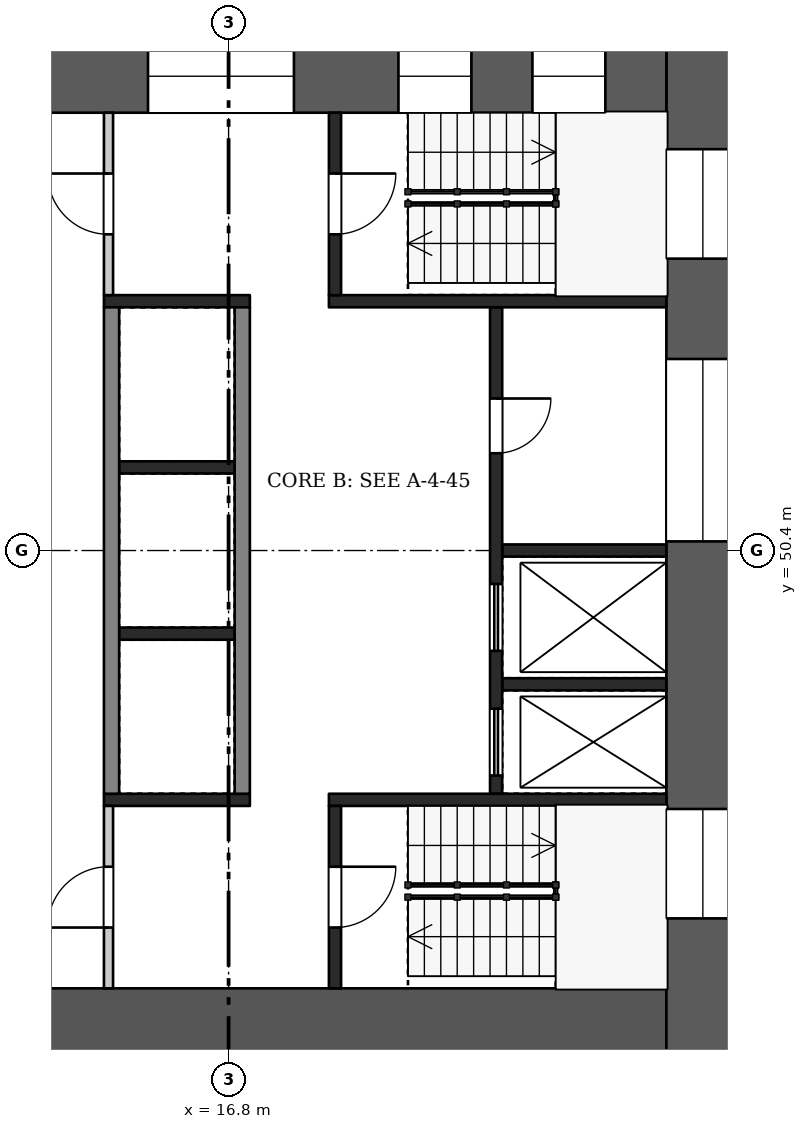
"""IFC4 building model, lengths in metres.
Left out: names, types, materials, properties, quantities, classifications, styles, units other than length and angle.
Written with IfcOpenShell. Run it as: python <this file> out.ifc"""

import sys

from ifc_helpers import new_model, si_unit, direction, frame, frame_2d, origin, place, context, subcontext, project, spatial, rectangle, extrude, element, fill, save


model = new_model("IFC4")
c1 = context("Model", 3, precision=1e-05, world=origin(), true_north=direction((0.0, 1.0)))
c2 = subcontext(c1, "Body", "Model", "MODEL_VIEW")
j1 = project(units=[si_unit("LENGTHUNIT", "METRE"), si_unit("PLANEANGLEUNIT", "RADIAN")], contexts=[c1])
p1 = place(None, origin())
s1 = spatial("IfcSite", under=j1, at=p1, CompositionType="ELEMENT")
p2 = place(p1, origin())
s2 = spatial("IfcBuilding", under=s1, at=p2, CompositionType="ELEMENT")
p3 = place(p2, frame((0.0, 0.0, 25.2)))
s3 = spatial("IfcBuildingStorey", under=s2, at=p3, CompositionType="ELEMENT", Elevation=25.2)
p4 = place(p3, frame((24.6, 58.8, 0.0), z_axis=(0.0, 0.0, 1.0), x_axis=(0.0, -1.0, 0.0)))
e1 = element("IfcWall", 1, at=p4, inside=s3, PredefinedType="SHEAR", context=c2, shape_type="SweptSolid", body=[
    extrude(rectangle(XDim=16.8, YDim=1.2, at=frame_2d((8.4, 0.0))), origin(), (0.0, 0.0, 1.0), 3.22),
])
p5 = place(p4, frame((1.8, 0.0, 0.5)))
e2 = element("IfcOpeningElement", 2, at=p5, cuts=e1, PredefinedType="OPENING", context=c2, shape_type="SweptSolid", body=[
    extrude(rectangle(XDim=1.8, YDim=2.4, at=frame_2d((0.9, 1.2))), frame((0.0, 0.61, 0.0), z_axis=(0.0, -1.0, 0.0), x_axis=(1.0, 0.0, 0.0)), (0.0, 0.0, 1.0), 1.22),
])
p6 = place(p4, frame((5.25, 0.0, 1.6)))
e3 = element("IfcOpeningElement", 3, at=p6, cuts=e1, PredefinedType="OPENING", context=c2, shape_type="SweptSolid", body=[
    extrude(rectangle(XDim=3.0, YDim=1.2, at=frame_2d((1.5, 0.6))), frame((0.0, 0.61, 0.0), z_axis=(0.0, -1.0, 0.0), x_axis=(1.0, 0.0, 0.0)), (0.0, 0.0, 1.0), 1.22),
])
p7 = place(p4, frame((12.65, 0.0, 0.5)))
e4 = element("IfcOpeningElement", 4, at=p7, cuts=e1, PredefinedType="OPENING", context=c2, shape_type="SweptSolid", body=[
    extrude(rectangle(XDim=1.8, YDim=2.4, at=frame_2d((0.9, 1.2))), frame((0.0, 0.61, 0.0), z_axis=(0.0, -1.0, 0.0), x_axis=(1.0, 0.0, 0.0)), (0.0, 0.0, 1.0), 1.22),
])
p8 = place(p3, frame((9.6, 58.2, 0.0), z_axis=(0.0, 0.0, 1.0), x_axis=(1.0, 0.0, 0.0)))
e5 = element("IfcWall", 5, at=p8, inside=s3, PredefinedType="SHEAR", context=c2, shape_type="SweptSolid", body=[
    extrude(rectangle(XDim=14.4, YDim=1.2, at=frame_2d((7.2, 0.0))), origin(), (0.0, 0.0, 1.0), 3.22),
])
p9 = place(p8, frame((1.105, 0.0, 0.6)))
e6 = element("IfcOpeningElement", 6, at=p9, cuts=e5, PredefinedType="OPENING", context=c2, shape_type="SweptSolid", body=[
    extrude(rectangle(XDim=3.0, YDim=2.1, at=frame_2d((1.5, 1.05))), frame((0.0, 0.61, 0.0), z_axis=(0.0, -1.0, 0.0), x_axis=(1.0, 0.0, 0.0)), (0.0, 0.0, 1.0), 1.22),
])
p10 = place(p8, frame((5.875, 0.0, 0.6)))
e7 = element("IfcOpeningElement", 7, at=p10, cuts=e5, PredefinedType="OPENING", context=c2, shape_type="SweptSolid", body=[
    extrude(rectangle(XDim=2.4, YDim=2.1, at=frame_2d((1.2, 1.05))), frame((0.0, 0.61, 0.0), z_axis=(0.0, -1.0, 0.0), x_axis=(1.0, 0.0, 0.0)), (0.0, 0.0, 1.0), 1.22),
])
p11 = place(p8, frame((9.993, 0.0, 0.5)))
e8 = element("IfcOpeningElement", 8, at=p11, cuts=e5, PredefinedType="OPENING", context=c2, shape_type="SweptSolid", body=[
    extrude(rectangle(XDim=1.2, YDim=2.4, at=frame_2d((0.6, 1.2))), frame((0.0, 0.61, 0.0), z_axis=(0.0, -1.0, 0.0), x_axis=(1.0, 0.0, 0.0)), (0.0, 0.0, 1.0), 1.22),
])
p12 = place(p8, frame((12.197, 0.0, 0.5)))
e9 = element("IfcOpeningElement", 9, at=p12, cuts=e5, PredefinedType="OPENING", context=c2, shape_type="SweptSolid", body=[
    extrude(rectangle(XDim=1.2, YDim=2.4, at=frame_2d((0.6, 1.2))), frame((0.0, 0.61, 0.0), z_axis=(0.0, -1.0, 0.0), x_axis=(1.0, 0.0, 0.0)), (0.0, 0.0, 1.0), 1.22),
])
p13 = place(p3, frame((9.6, 42.6, 0.0), z_axis=(0.0, 0.0, 1.0), x_axis=(1.0, 0.0, 0.0)))
e10 = element("IfcWall", 10, at=p13, inside=s3, PredefinedType="SHEAR", context=c2, shape_type="SweptSolid", body=[
    extrude(rectangle(XDim=14.4, YDim=1.2, at=frame_2d((7.2, 0.0))), origin(), (0.0, 0.0, 1.0), 3.22),
])
p14 = place(p13, frame((2.1, 0.0, 0.0)))
e11 = element("IfcOpeningElement", 11, at=p14, cuts=e10, PredefinedType="OPENING", context=c2, shape_type="SweptSolid", body=[
    extrude(rectangle(XDim=1.8, YDim=2.1, at=frame_2d((0.9, 1.05))), frame((0.0, 0.61, 0.0), z_axis=(0.0, -1.0, 0.0), x_axis=(1.0, 0.0, 0.0)), (0.0, 0.0, 1.0), 1.22),
])
for number, where, z_axis, x_axis in (
    (12, (15.0, 51.767, 0.0), (0.0, 0.0, 1.0), (1.0, 0.0, 0.0)),
    (13, (15.0, 49.033, 0.0), (0.0, 0.0, 1.0), (1.0, 0.0, 0.0)),
):
    element("IfcWall", number, at=place(p3, frame(where, z_axis=z_axis, x_axis=x_axis)), inside=s3, PredefinedType="SHEAR", context=c2, shape_type="SweptSolid", body=[
        extrude(rectangle(XDim=1.9, YDim=0.2, at=frame_2d((0.95, 0.0))), origin(), (0.0, 0.0, 1.0), 3.22),
    ])
for number, where, z_axis, x_axis in (
    (14, (14.875, 54.4, 0.0), (0.0, 0.0, 1.0), (0.0, -1.0, 0.0)),
    (15, (17.025, 54.4, 0.0), (0.0, 0.0, 1.0), (0.0, -1.0, 0.0)),
):
    element("IfcWall", number, at=place(p3, frame(where, z_axis=z_axis, x_axis=x_axis)), inside=s3, PredefinedType="SHEAR", context=c2, shape_type="SweptSolid", body=[
        extrude(rectangle(XDim=8.0, YDim=0.25, at=frame_2d((4.0, 0.0))), origin(), (0.0, 0.0, 1.0), 3.22),
    ])
for number, where, z_axis, x_axis in (
    (16, (21.3, 50.4, 0.0), (0.0, 0.0, 1.0), (1.0, 0.0, 0.0)),
    (17, (21.3, 48.2, 0.0), (0.0, 0.0, 1.0), (1.0, 0.0, 0.0)),
):
    element("IfcWall", number, at=place(p3, frame(where, z_axis=z_axis, x_axis=x_axis)), inside=s3, PredefinedType="SHEAR", context=c2, shape_type="SweptSolid", body=[
        extrude(rectangle(XDim=2.7, YDim=0.2, at=frame_2d((1.35, 0.0))), origin(), (0.0, 0.0, 1.0), 3.22),
    ])
p15 = place(p3, frame((21.2, 54.4, 0.0), z_axis=(0.0, 0.0, 1.0), x_axis=(0.0, -1.0, 0.0)))
e18 = element("IfcWall", 18, at=p15, inside=s3, PredefinedType="SHEAR", context=c2, shape_type="SweptSolid", body=[
    extrude(rectangle(XDim=8.0, YDim=0.2, at=frame_2d((4.0, 0.0))), origin(), (0.0, 0.0, 1.0), 3.22),
])
p16 = place(p15, frame((1.5, 0.0, 0.0)))
e19 = element("IfcOpeningElement", 19, at=p16, cuts=e18, PredefinedType="OPENING", context=c2, shape_type="SweptSolid", body=[
    extrude(rectangle(XDim=0.9, YDim=2.1, at=frame_2d((0.45, 1.05))), frame((0.0, 0.11, 0.0), z_axis=(0.0, -1.0, 0.0), x_axis=(1.0, 0.0, 0.0)), (0.0, 0.0, 1.0), 0.22),
])
p17 = place(p15, frame((4.55, 0.0, 0.0)))
e20 = element("IfcOpeningElement", 20, at=p17, cuts=e18, PredefinedType="OPENING", context=c2, shape_type="SweptSolid", body=[
    extrude(rectangle(XDim=1.1, YDim=2.1, at=frame_2d((0.55, 1.05))), frame((0.0, 0.11, 0.0), z_axis=(0.0, -1.0, 0.0), x_axis=(1.0, 0.0, 0.0)), (0.0, 0.0, 1.0), 0.22),
])
p18 = place(p15, frame((6.6, 0.0, 0.0)))
e21 = element("IfcOpeningElement", 21, at=p18, cuts=e18, PredefinedType="OPENING", context=c2, shape_type="SweptSolid", body=[
    extrude(rectangle(XDim=1.1, YDim=2.1, at=frame_2d((0.55, 1.05))), frame((0.0, 0.11, 0.0), z_axis=(0.0, -1.0, 0.0), x_axis=(1.0, 0.0, 0.0)), (0.0, 0.0, 1.0), 0.22),
])
p19 = place(p3, frame((14.75, 54.5, 0.0), z_axis=(0.0, 0.0, 1.0), x_axis=(1.0, 0.0, 0.0)))
e22 = element("IfcWall", 22, at=p19, inside=s3, PredefinedType="SHEAR", context=c2, shape_type="SweptSolid", body=[
    extrude(rectangle(XDim=2.4, YDim=0.2, at=frame_2d((1.2, 0.0))), origin(), (0.0, 0.0, 1.0), 3.22),
])
p20 = place(p3, frame((18.45, 54.5, 0.0), z_axis=(0.0, 0.0, 1.0), x_axis=(1.0, 0.0, 0.0)))
e23 = element("IfcWall", 23, at=p20, inside=s3, PredefinedType="SHEAR", context=c2, shape_type="SweptSolid", body=[
    extrude(rectangle(XDim=5.55, YDim=0.2, at=frame_2d((2.775, 0.0))), origin(), (0.0, 0.0, 1.0), 3.22),
])
p21 = place(p3, frame((14.825, 57.6, 0.0), z_axis=(0.0, 0.0, 1.0), x_axis=(0.0, -1.0, 0.0)))
e24 = element("IfcWall", 24, at=p21, inside=s3, PredefinedType="PARTITIONING", context=c2, shape_type="SweptSolid", body=[
    extrude(rectangle(XDim=3.0, YDim=0.15, at=frame_2d((1.5, 0.0))), origin(), (0.0, 0.0, 1.0), 3.22),
])
p22 = place(p21, frame((1.0, 0.0, 0.0)))
e25 = element("IfcOpeningElement", 25, at=p22, cuts=e24, PredefinedType="OPENING", context=c2, shape_type="SweptSolid", body=[
    extrude(rectangle(XDim=1.0, YDim=2.1, at=frame_2d((0.5, 1.05))), frame((0.0, 0.085, 0.0), z_axis=(0.0, -1.0, 0.0), x_axis=(1.0, 0.0, 0.0)), (0.0, 0.0, 1.0), 0.17),
])
p23 = place(p3, frame((18.55, 57.6, 0.0), z_axis=(0.0, 0.0, 1.0), x_axis=(0.0, -1.0, 0.0)))
e26 = element("IfcWall", 26, at=p23, inside=s3, PredefinedType="SHEAR", context=c2, shape_type="SweptSolid", body=[
    extrude(rectangle(XDim=3.0, YDim=0.2, at=frame_2d((1.5, 0.0))), origin(), (0.0, 0.0, 1.0), 3.22),
])
p24 = place(p23, frame((1.0, 0.0, 0.0)))
e27 = element("IfcOpeningElement", 27, at=p24, cuts=e26, PredefinedType="OPENING", context=c2, shape_type="SweptSolid", body=[
    extrude(rectangle(XDim=1.0, YDim=2.1, at=frame_2d((0.5, 1.05))), frame((0.0, 0.11, 0.0), z_axis=(0.0, -1.0, 0.0), x_axis=(1.0, 0.0, 0.0)), (0.0, 0.0, 1.0), 0.22),
])
p25 = place(p3, frame((14.75, 46.3, 0.0), z_axis=(0.0, 0.0, 1.0), x_axis=(1.0, 0.0, 0.0)))
e28 = element("IfcWall", 28, at=p25, inside=s3, PredefinedType="SHEAR", context=c2, shape_type="SweptSolid", body=[
    extrude(rectangle(XDim=2.4, YDim=0.2, at=frame_2d((1.2, 0.0))), origin(), (0.0, 0.0, 1.0), 3.22),
])
p26 = place(p3, frame((18.45, 46.3, 0.0), z_axis=(0.0, 0.0, 1.0), x_axis=(1.0, 0.0, 0.0)))
e29 = element("IfcWall", 29, at=p26, inside=s3, PredefinedType="SHEAR", context=c2, shape_type="SweptSolid", body=[
    extrude(rectangle(XDim=5.55, YDim=0.2, at=frame_2d((2.775, 0.0))), origin(), (0.0, 0.0, 1.0), 3.22),
])
p27 = place(p3, frame((14.825, 46.2, 0.0), z_axis=(0.0, 0.0, 1.0), x_axis=(0.0, -1.0, 0.0)))
e30 = element("IfcWall", 30, at=p27, inside=s3, PredefinedType="PARTITIONING", context=c2, shape_type="SweptSolid", body=[
    extrude(rectangle(XDim=3.0, YDim=0.15, at=frame_2d((1.5, 0.0))), origin(), (0.0, 0.0, 1.0), 3.22),
])
p28 = place(p27, frame((1.0, 0.0, 0.0)))
e31 = element("IfcOpeningElement", 31, at=p28, cuts=e30, PredefinedType="OPENING", context=c2, shape_type="SweptSolid", body=[
    extrude(rectangle(XDim=1.0, YDim=2.1, at=frame_2d((0.5, 1.05))), frame((0.0, 0.085, 0.0), z_axis=(0.0, -1.0, 0.0), x_axis=(1.0, 0.0, 0.0)), (0.0, 0.0, 1.0), 0.17),
])
p29 = place(p3, frame((18.55, 46.2, 0.0), z_axis=(0.0, 0.0, 1.0), x_axis=(0.0, -1.0, 0.0)))
e32 = element("IfcWall", 32, at=p29, inside=s3, PredefinedType="SHEAR", context=c2, shape_type="SweptSolid", body=[
    extrude(rectangle(XDim=3.0, YDim=0.2, at=frame_2d((1.5, 0.0))), origin(), (0.0, 0.0, 1.0), 3.22),
])
p30 = place(p29, frame((1.0, 0.0, 0.0)))
e33 = element("IfcOpeningElement", 33, at=p30, cuts=e32, PredefinedType="OPENING", context=c2, shape_type="SweptSolid", body=[
    extrude(rectangle(XDim=1.0, YDim=2.1, at=frame_2d((0.5, 1.05))), frame((0.0, 0.11, 0.0), z_axis=(0.0, -1.0, 0.0), x_axis=(1.0, 0.0, 0.0)), (0.0, 0.0, 1.0), 0.22),
])
p31 = place(p16, origin())
e34 = element("IfcDoor", 34, at=p31, inside=s3, OperationType="SINGLE_SWING_LEFT", PredefinedType="DOOR", context=c2, shape_type="SweptSolid", body=[
    extrude(rectangle(XDim=0.9, YDim=2.1, at=frame_2d((0.45, 1.05))), frame((0.0, 0.025, 0.0), z_axis=(0.0, -1.0, 0.0), x_axis=(1.0, 0.0, 0.0)), (0.0, 0.0, 1.0), 0.05),
])
fill(e19, e34)
p32 = place(p17, origin())
e35 = element("IfcDoor", 35, at=p32, inside=s3, OperationType="DOUBLE_DOOR_SLIDING", PredefinedType="DOOR", context=c2, shape_type="SweptSolid", body=[
    extrude(rectangle(XDim=1.1, YDim=2.1, at=frame_2d((0.55, 1.05))), frame((0.0, 0.025, 0.0), z_axis=(0.0, -1.0, 0.0), x_axis=(1.0, 0.0, 0.0)), (0.0, 0.0, 1.0), 0.05),
])
fill(e20, e35)
p33 = place(p18, origin())
e36 = element("IfcDoor", 36, at=p33, inside=s3, OperationType="DOUBLE_DOOR_SLIDING", PredefinedType="DOOR", context=c2, shape_type="SweptSolid", body=[
    extrude(rectangle(XDim=1.1, YDim=2.1, at=frame_2d((0.55, 1.05))), frame((0.0, 0.025, 0.0), z_axis=(0.0, -1.0, 0.0), x_axis=(1.0, 0.0, 0.0)), (0.0, 0.0, 1.0), 0.05),
])
fill(e21, e36)
p34 = place(p22, frame((1.0, 0.0, 0.0), z_axis=(0.0, 0.0, 1.0), x_axis=(-1.0, 0.0, 0.0)))
e37 = element("IfcDoor", 37, at=p34, inside=s3, OperationType="SINGLE_SWING_RIGHT", PredefinedType="DOOR", context=c2, shape_type="SweptSolid", body=[
    extrude(rectangle(XDim=1.0, YDim=2.1, at=frame_2d((0.5, 1.05))), frame((0.0, 0.025, 0.0), z_axis=(0.0, -1.0, 0.0), x_axis=(1.0, 0.0, 0.0)), (0.0, 0.0, 1.0), 0.05),
])
fill(e25, e37)
p35 = place(p24, origin())
e38 = element("IfcDoor", 38, at=p35, inside=s3, OperationType="SINGLE_SWING_LEFT", PredefinedType="DOOR", context=c2, shape_type="SweptSolid", body=[
    extrude(rectangle(XDim=1.0, YDim=2.1, at=frame_2d((0.5, 1.05))), frame((0.0, 0.025, 0.0), z_axis=(0.0, -1.0, 0.0), x_axis=(1.0, 0.0, 0.0)), (0.0, 0.0, 1.0), 0.05),
])
fill(e27, e38)
p36 = place(p28, frame((1.0, 0.0, 0.0), z_axis=(0.0, 0.0, 1.0), x_axis=(-1.0, 0.0, 0.0)))
e39 = element("IfcDoor", 39, at=p36, inside=s3, OperationType="SINGLE_SWING_LEFT", PredefinedType="DOOR", context=c2, shape_type="SweptSolid", body=[
    extrude(rectangle(XDim=1.0, YDim=2.1, at=frame_2d((0.5, 1.05))), frame((0.0, 0.025, 0.0), z_axis=(0.0, -1.0, 0.0), x_axis=(1.0, 0.0, 0.0)), (0.0, 0.0, 1.0), 0.05),
])
fill(e31, e39)
p37 = place(p30, origin())
e40 = element("IfcDoor", 40, at=p37, inside=s3, OperationType="SINGLE_SWING_LEFT", PredefinedType="DOOR", context=c2, shape_type="SweptSolid", body=[
    extrude(rectangle(XDim=1.0, YDim=2.1, at=frame_2d((0.5, 1.05))), frame((0.0, 0.025, 0.0), z_axis=(0.0, -1.0, 0.0), x_axis=(1.0, 0.0, 0.0)), (0.0, 0.0, 1.0), 0.05),
])
fill(e33, e40)
p38 = place(p5, origin())
e41 = element("IfcWindow", 41, at=p38, inside=s3, PartitioningType="SINGLE_PANEL", PredefinedType="WINDOW", context=c2, shape_type="SweptSolid", body=[
    extrude(rectangle(XDim=1.8, YDim=2.4, at=frame_2d((0.9, 1.2))), frame((0.0, 0.03, 0.0), z_axis=(0.0, -1.0, 0.0), x_axis=(1.0, 0.0, 0.0)), (0.0, 0.0, 1.0), 0.06),
])
fill(e2, e41)
p39 = place(p6, origin())
e42 = element("IfcWindow", 42, at=p39, inside=s3, PartitioningType="SINGLE_PANEL", PredefinedType="WINDOW", context=c2, shape_type="SweptSolid", body=[
    extrude(rectangle(XDim=3.0, YDim=1.2, at=frame_2d((1.5, 0.6))), frame((0.0, 0.03, 0.0), z_axis=(0.0, -1.0, 0.0), x_axis=(1.0, 0.0, 0.0)), (0.0, 0.0, 1.0), 0.06),
])
fill(e3, e42)
p40 = place(p7, origin())
e43 = element("IfcWindow", 43, at=p40, inside=s3, PartitioningType="SINGLE_PANEL", PredefinedType="WINDOW", context=c2, shape_type="SweptSolid", body=[
    extrude(rectangle(XDim=1.8, YDim=2.4, at=frame_2d((0.9, 1.2))), frame((0.0, 0.03, 0.0), z_axis=(0.0, -1.0, 0.0), x_axis=(1.0, 0.0, 0.0)), (0.0, 0.0, 1.0), 0.06),
])
fill(e4, e43)
p41 = place(p10, origin())
e44 = element("IfcWindow", 44, at=p41, inside=s3, PartitioningType="SINGLE_PANEL", PredefinedType="WINDOW", context=c2, shape_type="SweptSolid", body=[
    extrude(rectangle(XDim=2.4, YDim=2.1, at=frame_2d((1.2, 1.05))), frame((0.0, 0.03, 0.0), z_axis=(0.0, -1.0, 0.0), x_axis=(1.0, 0.0, 0.0)), (0.0, 0.0, 1.0), 0.06),
])
fill(e7, e44)
p42 = place(p11, origin())
e45 = element("IfcWindow", 45, at=p42, inside=s3, PartitioningType="SINGLE_PANEL", PredefinedType="WINDOW", context=c2, shape_type="SweptSolid", body=[
    extrude(rectangle(XDim=1.2, YDim=2.4, at=frame_2d((0.6, 1.2))), frame((0.0, 0.03, 0.0), z_axis=(0.0, -1.0, 0.0), x_axis=(1.0, 0.0, 0.0)), (0.0, 0.0, 1.0), 0.06),
])
fill(e8, e45)
p43 = place(p12, origin())
e46 = element("IfcWindow", 46, at=p43, inside=s3, PartitioningType="SINGLE_PANEL", PredefinedType="WINDOW", context=c2, shape_type="SweptSolid", body=[
    extrude(rectangle(XDim=1.2, YDim=2.4, at=frame_2d((0.6, 1.2))), frame((0.0, 0.03, 0.0), z_axis=(0.0, -1.0, 0.0), x_axis=(1.0, 0.0, 0.0)), (0.0, 0.0, 1.0), 0.06),
])
fill(e9, e46)
save(model, sys.argv[1])
